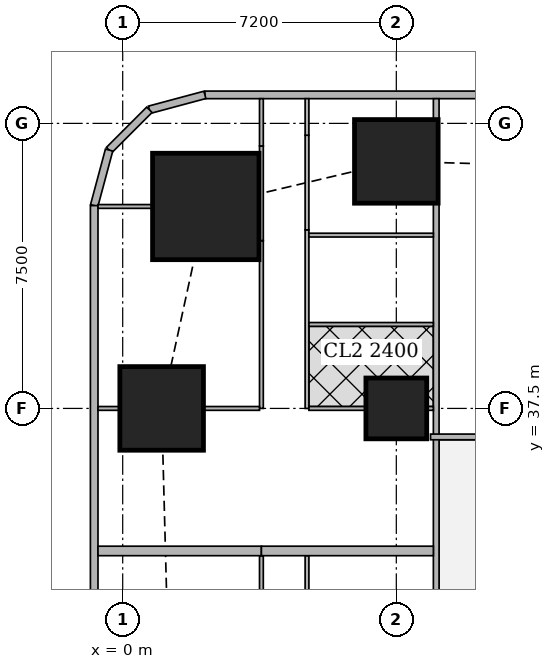
"""IFC4 building model, lengths in metres.
Left out: names, types, materials, properties, quantities, classifications, styles, units other than length and angle.
Written with IfcOpenShell. Run it as: python <this file> out.ifc"""

import sys

from ifc_helpers import new_model, si_unit, direction, frame, frame_2d, origin, origin_2d, place, context, subcontext, project, spatial, rectangle, extrude, element, fill, save


model = new_model("IFC4")
c1 = context("Model", 3, precision=1e-05, world=origin(), true_north=direction((0.0, 1.0)))
c2 = subcontext(c1, "Body", "Model", "MODEL_VIEW")
j1 = project(units=[si_unit("LENGTHUNIT", "METRE"), si_unit("PLANEANGLEUNIT", "RADIAN")], contexts=[c1])
p1 = place(None, origin())
s1 = spatial("IfcSite", under=j1, at=p1, CompositionType="ELEMENT")
p2 = place(p1, origin())
s2 = spatial("IfcBuilding", under=s1, at=p2, CompositionType="ELEMENT")
p3 = place(p2, frame((0.0, 0.0, 100.4)))
s3 = spatial("IfcBuildingStorey", under=s2, at=p3, CompositionType="ELEMENT", Elevation=100.4)
p4 = place(p3, frame((1.025, 37.5, 0.0), z_axis=(0.0, 0.0, 1.0), x_axis=(1.0, 0.0, 0.0)))
e1 = element("IfcColumn", 1, at=p4, inside=s3, PredefinedType="COLUMN", context=c2, shape_type="SweptSolid", body=[
    extrude(rectangle(XDim=2.2, YDim=2.2, at=origin_2d()), origin(), (0.0, 0.0, 1.0), 3.75),
])
p5 = place(p3, frame((7.2, 37.5, 0.0), z_axis=(0.0, 0.0, 1.0), x_axis=(1.0, 0.0, 0.0)))
e2 = element("IfcColumn", 2, at=p5, inside=s3, PredefinedType="COLUMN", context=c2, shape_type="SweptSolid", body=[
    extrude(rectangle(XDim=1.6, YDim=1.6, at=origin_2d()), origin(), (0.0, 0.0, 1.0), 3.75),
])
p6 = place(p3, frame((2.186, 42.814, 0.0), z_axis=(0.0, 0.0, 1.0), x_axis=(1.0, 0.0, 0.0)))
e3 = element("IfcColumn", 3, at=p6, inside=s3, PredefinedType="COLUMN", context=c2, shape_type="SweptSolid", body=[
    extrude(rectangle(XDim=2.8, YDim=2.8, at=origin_2d()), origin(), (0.0, 0.0, 1.0), 3.75),
])
p7 = place(p3, frame((7.2, 44.0, 0.0), z_axis=(0.0, 0.0, 1.0), x_axis=(1.0, 0.0, 0.0)))
e4 = element("IfcColumn", 4, at=p7, inside=s3, PredefinedType="COLUMN", context=c2, shape_type="SweptSolid", body=[
    extrude(rectangle(XDim=2.2, YDim=2.2, at=origin_2d()), origin(), (0.0, 0.0, 1.0), 3.75),
])
p8 = place(p3, frame((40.106, 45.75, 0.0), z_axis=(0.0, 0.0, 1.0), x_axis=(-1.0, 0.0, 0.0)))
e5 = element("IfcWall", 5, at=p8, inside=s3, PredefinedType="SOLIDWALL", context=c2, shape_type="SweptSolid", body=[
    extrude(rectangle(XDim=37.943, YDim=0.2, at=frame_2d((18.971, 0.0))), origin(), (0.0, 0.0, 1.0), 3.5),
])
p9 = place(p8, frame((8.606, 0.0, 0.9)))
e6 = element("IfcOpeningElement", 6, at=p9, cuts=e5, PredefinedType="OPENING", context=c2, shape_type="SweptSolid", body=[
    extrude(rectangle(XDim=1.8, YDim=1.5, at=frame_2d((0.9, 0.75))), frame((0.0, 0.11, 0.0), z_axis=(0.0, -1.0, 0.0), x_axis=(1.0, 0.0, 0.0)), (0.0, 0.0, 1.0), 0.22),
])
p10 = place(p8, frame((12.206, 0.0, 0.9)))
e7 = element("IfcOpeningElement", 7, at=p10, cuts=e5, PredefinedType="OPENING", context=c2, shape_type="SweptSolid", body=[
    extrude(rectangle(XDim=1.8, YDim=1.5, at=frame_2d((0.9, 0.75))), frame((0.0, 0.11, 0.0), z_axis=(0.0, -1.0, 0.0), x_axis=(1.0, 0.0, 0.0)), (0.0, 0.0, 1.0), 0.22),
])
p11 = place(p8, frame((15.806, 0.0, 0.9)))
e8 = element("IfcOpeningElement", 8, at=p11, cuts=e5, PredefinedType="OPENING", context=c2, shape_type="SweptSolid", body=[
    extrude(rectangle(XDim=1.8, YDim=1.5, at=frame_2d((0.9, 0.75))), frame((0.0, 0.11, 0.0), z_axis=(0.0, -1.0, 0.0), x_axis=(1.0, 0.0, 0.0)), (0.0, 0.0, 1.0), 0.22),
])
p12 = place(p8, frame((19.406, 0.0, 0.9)))
e9 = element("IfcOpeningElement", 9, at=p12, cuts=e5, PredefinedType="OPENING", context=c2, shape_type="SweptSolid", body=[
    extrude(rectangle(XDim=1.8, YDim=1.5, at=frame_2d((0.9, 0.75))), frame((0.0, 0.11, 0.0), z_axis=(0.0, -1.0, 0.0), x_axis=(1.0, 0.0, 0.0)), (0.0, 0.0, 1.0), 0.22),
])
p13 = place(p8, frame((23.006, 0.0, 0.9)))
e10 = element("IfcOpeningElement", 10, at=p13, cuts=e5, PredefinedType="OPENING", context=c2, shape_type="SweptSolid", body=[
    extrude(rectangle(XDim=1.8, YDim=1.5, at=frame_2d((0.9, 0.75))), frame((0.0, 0.11, 0.0), z_axis=(0.0, -1.0, 0.0), x_axis=(1.0, 0.0, 0.0)), (0.0, 0.0, 1.0), 0.22),
])
p14 = place(p8, frame((26.606, 0.0, 0.9)))
e11 = element("IfcOpeningElement", 11, at=p14, cuts=e5, PredefinedType="OPENING", context=c2, shape_type="SweptSolid", body=[
    extrude(rectangle(XDim=1.8, YDim=1.5, at=frame_2d((0.9, 0.75))), frame((0.0, 0.11, 0.0), z_axis=(0.0, -1.0, 0.0), x_axis=(1.0, 0.0, 0.0)), (0.0, 0.0, 1.0), 0.22),
])
p15 = place(p3, frame((2.163, 45.75, 0.0), z_axis=(0.0, 0.0, 1.0), x_axis=(-0.965832000415, -0.259168954497, 0.0)))
e12 = element("IfcWall", 12, at=p15, inside=s3, PredefinedType="SOLIDWALL", context=c2, shape_type="SweptSolid", body=[
    extrude(rectangle(XDim=1.513, YDim=0.2, at=frame_2d((0.756, 0.0))), origin(), (0.0, 0.0, 1.0), 3.5),
])
p16 = place(p3, frame((0.702, 45.358, 0.0), z_axis=(0.0, 0.0, 1.0), x_axis=(-0.707106781187, -0.707106781187, 0.0)))
e13 = element("IfcWall", 13, at=p16, inside=s3, PredefinedType="SOLIDWALL", context=c2, shape_type="SweptSolid", body=[
    extrude(rectangle(XDim=1.499, YDim=0.2, at=frame_2d((0.75, 0.0))), origin(), (0.0, 0.0, 1.0), 3.5),
])
p17 = place(p3, frame((-0.358, 44.298, 0.0), z_axis=(0.0, 0.0, 1.0), x_axis=(-0.259168954497, -0.965832000415, 0.0)))
e14 = element("IfcWall", 14, at=p17, inside=s3, PredefinedType="SOLIDWALL", context=c2, shape_type="SweptSolid", body=[
    extrude(rectangle(XDim=1.513, YDim=0.2, at=frame_2d((0.756, 0.0))), origin(), (0.0, 0.0, 1.0), 3.5),
])
p18 = place(p3, frame((-0.75, 42.837, 0.0), z_axis=(0.0, 0.0, 1.0), x_axis=(0.0, -1.0, 0.0)))
e15 = element("IfcWall", 15, at=p18, inside=s3, PredefinedType="SOLIDWALL", context=c2, shape_type="SweptSolid", body=[
    extrude(rectangle(XDim=40.674, YDim=0.2, at=frame_2d((20.337, 0.0))), origin(), (0.0, 0.0, 1.0), 3.5),
])
p19 = place(p18, frame((1.78, 0.0, 0.9)))
e16 = element("IfcOpeningElement", 16, at=p19, cuts=e15, PredefinedType="OPENING", context=c2, shape_type="SweptSolid", body=[
    extrude(rectangle(XDim=1.8, YDim=1.5, at=frame_2d((0.9, 0.75))), frame((0.0, 0.11, 0.0), z_axis=(0.0, -1.0, 0.0), x_axis=(1.0, 0.0, 0.0)), (0.0, 0.0, 1.0), 0.22),
])
p20 = place(p18, frame((6.312, 0.0, 0.9)))
e17 = element("IfcOpeningElement", 17, at=p20, cuts=e15, PredefinedType="OPENING", context=c2, shape_type="SweptSolid", body=[
    extrude(rectangle(XDim=1.8, YDim=1.5, at=frame_2d((0.9, 0.75))), frame((0.0, 0.11, 0.0), z_axis=(0.0, -1.0, 0.0), x_axis=(1.0, 0.0, 0.0)), (0.0, 0.0, 1.0), 0.22),
])
p21 = place(p18, frame((10.062, 0.0, 0.9)))
e18 = element("IfcOpeningElement", 18, at=p21, cuts=e15, PredefinedType="OPENING", context=c2, shape_type="SweptSolid", body=[
    extrude(rectangle(XDim=1.8, YDim=1.5, at=frame_2d((0.9, 0.75))), frame((0.0, 0.11, 0.0), z_axis=(0.0, -1.0, 0.0), x_axis=(1.0, 0.0, 0.0)), (0.0, 0.0, 1.0), 0.22),
])
p22 = place(p18, frame((13.812, 0.0, 0.9)))
e19 = element("IfcOpeningElement", 19, at=p22, cuts=e15, PredefinedType="OPENING", context=c2, shape_type="SweptSolid", body=[
    extrude(rectangle(XDim=1.8, YDim=1.5, at=frame_2d((0.9, 0.75))), frame((0.0, 0.11, 0.0), z_axis=(0.0, -1.0, 0.0), x_axis=(1.0, 0.0, 0.0)), (0.0, 0.0, 1.0), 0.22),
])
p23 = place(p18, frame((17.562, 0.0, 0.9)))
e20 = element("IfcOpeningElement", 20, at=p23, cuts=e15, PredefinedType="OPENING", context=c2, shape_type="SweptSolid", body=[
    extrude(rectangle(XDim=1.8, YDim=1.5, at=frame_2d((0.9, 0.75))), frame((0.0, 0.11, 0.0), z_axis=(0.0, -1.0, 0.0), x_axis=(1.0, 0.0, 0.0)), (0.0, 0.0, 1.0), 0.22),
])
p24 = place(p18, frame((21.312, 0.0, 0.9)))
e21 = element("IfcOpeningElement", 21, at=p24, cuts=e15, PredefinedType="OPENING", context=c2, shape_type="SweptSolid", body=[
    extrude(rectangle(XDim=1.8, YDim=1.5, at=frame_2d((0.9, 0.75))), frame((0.0, 0.11, 0.0), z_axis=(0.0, -1.0, 0.0), x_axis=(1.0, 0.0, 0.0)), (0.0, 0.0, 1.0), 0.22),
])
p25 = place(p18, frame((25.062, 0.0, 0.9)))
e22 = element("IfcOpeningElement", 22, at=p25, cuts=e15, PredefinedType="OPENING", context=c2, shape_type="SweptSolid", body=[
    extrude(rectangle(XDim=1.8, YDim=1.5, at=frame_2d((0.9, 0.75))), frame((0.0, 0.11, 0.0), z_axis=(0.0, -1.0, 0.0), x_axis=(1.0, 0.0, 0.0)), (0.0, 0.0, 1.0), 0.22),
])
p26 = place(p18, frame((28.812, 0.0, 0.9)))
e23 = element("IfcOpeningElement", 23, at=p26, cuts=e15, PredefinedType="OPENING", context=c2, shape_type="SweptSolid", body=[
    extrude(rectangle(XDim=1.8, YDim=1.5, at=frame_2d((0.9, 0.75))), frame((0.0, 0.11, 0.0), z_axis=(0.0, -1.0, 0.0), x_axis=(1.0, 0.0, 0.0)), (0.0, 0.0, 1.0), 0.22),
])
p27 = place(p18, frame((32.562, 0.0, 0.9)))
e24 = element("IfcOpeningElement", 24, at=p27, cuts=e15, PredefinedType="OPENING", context=c2, shape_type="SweptSolid", body=[
    extrude(rectangle(XDim=1.8, YDim=1.5, at=frame_2d((0.9, 0.75))), frame((0.0, 0.11, 0.0), z_axis=(0.0, -1.0, 0.0), x_axis=(1.0, 0.0, 0.0)), (0.0, 0.0, 1.0), 0.22),
])
p28 = place(p18, frame((37.094, 0.0, 0.9)))
e25 = element("IfcOpeningElement", 25, at=p28, cuts=e15, PredefinedType="OPENING", context=c2, shape_type="SweptSolid", body=[
    extrude(rectangle(XDim=1.8, YDim=1.5, at=frame_2d((0.9, 0.75))), frame((0.0, 0.11, 0.0), z_axis=(0.0, -1.0, 0.0), x_axis=(1.0, 0.0, 0.0)), (0.0, 0.0, 1.0), 0.22),
])
p29 = place(p3, frame((8.25, 2.126, 0.0), z_axis=(0.0, 0.0, 1.0), x_axis=(0.0, 1.0, 0.0)))
e26 = element("IfcWall", 26, at=p29, inside=s3, PredefinedType="SOLIDWALL", context=c2, shape_type="SweptSolid", body=[
    extrude(rectangle(XDim=40.773, YDim=0.15, at=frame_2d((20.386, 0.0))), origin(), (0.0, 0.0, 1.0), 3.5),
])
p30 = place(p29, frame((10.286, 0.0, 0.0)))
e27 = element("IfcOpeningElement", 27, at=p30, cuts=e26, PredefinedType="OPENING", context=c2, shape_type="SweptSolid", body=[
    extrude(rectangle(XDim=1.0, YDim=2.1, at=frame_2d((0.5, 1.05))), frame((0.0, 0.085, 0.0), z_axis=(0.0, -1.0, 0.0), x_axis=(1.0, 0.0, 0.0)), (0.0, 0.0, 1.0), 0.17),
])
p31 = place(p29, frame((14.461, 0.0, 0.0)))
e28 = element("IfcOpeningElement", 28, at=p31, cuts=e26, PredefinedType="OPENING", context=c2, shape_type="SweptSolid", body=[
    extrude(rectangle(XDim=1.0, YDim=2.1, at=frame_2d((0.5, 1.05))), frame((0.0, 0.085, 0.0), z_axis=(0.0, -1.0, 0.0), x_axis=(1.0, 0.0, 0.0)), (0.0, 0.0, 1.0), 0.17),
])
p32 = place(p29, frame((25.287, 0.0, 0.0)))
e29 = element("IfcOpeningElement", 29, at=p32, cuts=e26, PredefinedType="OPENING", context=c2, shape_type="SweptSolid", body=[
    extrude(rectangle(XDim=1.0, YDim=2.1, at=frame_2d((0.5, 1.05))), frame((0.0, 0.085, 0.0), z_axis=(0.0, -1.0, 0.0), x_axis=(1.0, 0.0, 0.0)), (0.0, 0.0, 1.0), 0.17),
])
p33 = place(p29, frame((32.787, 0.0, 0.0)))
e30 = element("IfcOpeningElement", 30, at=p33, cuts=e26, PredefinedType="OPENING", context=c2, shape_type="SweptSolid", body=[
    extrude(rectangle(XDim=1.0, YDim=2.1, at=frame_2d((0.5, 1.05))), frame((0.0, 0.085, 0.0), z_axis=(0.0, -1.0, 0.0), x_axis=(1.0, 0.0, 0.0)), (0.0, 0.0, 1.0), 0.17),
])
p34 = place(p3, frame((8.25, 45.101, 0.0), z_axis=(0.0, 0.0, 1.0), x_axis=(0.0, 1.0, 0.0)))
e31 = element("IfcWall", 31, at=p34, inside=s3, PredefinedType="SOLIDWALL", context=c2, shape_type="SweptSolid", body=[
    extrude(rectangle(XDim=0.549, YDim=0.15, at=frame_2d((0.274, 0.0))), origin(), (0.0, 0.0, 1.0), 3.5),
])
p35 = place(p3, frame((8.1, 36.75, 0.0), z_axis=(0.0, 0.0, 1.0), x_axis=(1.0, 0.0, 0.0)))
e32 = element("IfcWall", 32, at=p35, inside=s3, PredefinedType="SOLIDWALL", context=c2, shape_type="SweptSolid", body=[
    extrude(rectangle(XDim=5.499, YDim=0.15, at=frame_2d((2.75, 0.0))), origin(), (0.0, 0.0, 1.0), 3.5),
])
p36 = place(p35, frame((2.725, 0.0, 0.0)))
e33 = element("IfcOpeningElement", 33, at=p36, cuts=e32, PredefinedType="OPENING", context=c2, shape_type="SweptSolid", body=[
    extrude(rectangle(XDim=1.0, YDim=2.1, at=frame_2d((0.5, 1.05))), frame((0.0, 0.085, 0.0), z_axis=(0.0, -1.0, 0.0), x_axis=(1.0, 0.0, 0.0)), (0.0, 0.0, 1.0), 0.17),
])
p37 = place(p3, frame((3.65, 30.0, 0.0), z_axis=(0.0, 0.0, 1.0), x_axis=(0.0, 1.0, 0.0)))
e34 = element("IfcWall", 34, at=p37, inside=s3, PredefinedType="PARTITIONING", context=c2, shape_type="SweptSolid", body=[
    extrude(rectangle(XDim=3.625, YDim=0.1, at=frame_2d((1.812, 0.0))), origin(), (0.0, 0.0, 1.0), 3.5),
])
p38 = place(p37, frame((0.2, 0.0, 0.0)))
e35 = element("IfcOpeningElement", 35, at=p38, cuts=e34, PredefinedType="OPENING", context=c2, shape_type="SweptSolid", body=[
    extrude(rectangle(XDim=0.9, YDim=2.1, at=frame_2d((0.45, 1.05))), frame((0.0, 0.06, 0.0), z_axis=(0.0, -1.0, 0.0), x_axis=(1.0, 0.0, 0.0)), (0.0, 0.0, 1.0), 0.12),
])
p39 = place(p3, frame((4.85, 30.0, 0.0), z_axis=(0.0, 0.0, 1.0), x_axis=(0.0, 1.0, 0.0)))
e36 = element("IfcWall", 36, at=p39, inside=s3, PredefinedType="PARTITIONING", context=c2, shape_type="SweptSolid", body=[
    extrude(rectangle(XDim=3.625, YDim=0.1, at=frame_2d((1.812, 0.0))), origin(), (0.0, 0.0, 1.0), 3.5),
])
p40 = place(p39, frame((0.655, 0.0, 0.0)))
e37 = element("IfcOpeningElement", 37, at=p40, cuts=e36, PredefinedType="OPENING", context=c2, shape_type="SweptSolid", body=[
    extrude(rectangle(XDim=0.9, YDim=2.1, at=frame_2d((0.45, 1.05))), frame((0.0, 0.06, 0.0), z_axis=(0.0, -1.0, 0.0), x_axis=(1.0, 0.0, 0.0)), (0.0, 0.0, 1.0), 0.12),
])
p41 = place(p39, frame((2.53, 0.0, 0.0)))
e38 = element("IfcOpeningElement", 38, at=p41, cuts=e36, PredefinedType="OPENING", context=c2, shape_type="SweptSolid", body=[
    extrude(rectangle(XDim=0.9, YDim=2.1, at=frame_2d((0.45, 1.05))), frame((0.0, 0.06, 0.0), z_axis=(0.0, -1.0, 0.0), x_axis=(1.0, 0.0, 0.0)), (0.0, 0.0, 1.0), 0.12),
])
p42 = place(p3, frame((3.65, 37.5, 0.0), z_axis=(0.0, 0.0, 1.0), x_axis=(0.0, 1.0, 0.0)))
e39 = element("IfcWall", 39, at=p42, inside=s3, PredefinedType="PARTITIONING", context=c2, shape_type="SweptSolid", body=[
    extrude(rectangle(XDim=4.415, YDim=0.1, at=frame_2d((2.208, 0.0))), origin(), (0.0, 0.0, 1.0), 3.5),
])
p43 = place(p42, frame((0.2, 0.0, 0.0)))
e40 = element("IfcOpeningElement", 40, at=p43, cuts=e39, PredefinedType="OPENING", context=c2, shape_type="SweptSolid", body=[
    extrude(rectangle(XDim=0.9, YDim=2.1, at=frame_2d((0.45, 1.05))), frame((0.0, 0.06, 0.0), z_axis=(0.0, -1.0, 0.0), x_axis=(1.0, 0.0, 0.0)), (0.0, 0.0, 1.0), 0.12),
])
p44 = place(p3, frame((3.65, 41.915, 0.0), z_axis=(0.0, 0.0, 1.0), x_axis=(0.0, 1.0, 0.0)))
e41 = element("IfcWall", 41, at=p44, inside=s3, PredefinedType="PARTITIONING", context=c2, shape_type="SweptSolid", body=[
    extrude(rectangle(XDim=2.49, YDim=0.1, at=frame_2d((1.245, 0.0))), origin(), (0.0, 0.0, 1.0), 2.05),
])
p45 = place(p3, frame((3.65, 44.405, 0.0), z_axis=(0.0, 0.0, 1.0), x_axis=(0.0, 1.0, 0.0)))
e42 = element("IfcWall", 42, at=p45, inside=s3, PredefinedType="PARTITIONING", context=c2, shape_type="SweptSolid", body=[
    extrude(rectangle(XDim=1.245, YDim=0.1, at=frame_2d((0.623, 0.0))), origin(), (0.0, 0.0, 1.0), 3.5),
])
p46 = place(p3, frame((4.85, 37.5, 0.0), z_axis=(0.0, 0.0, 1.0), x_axis=(0.0, 1.0, 0.0)))
e43 = element("IfcWall", 43, at=p46, inside=s3, PredefinedType="PARTITIONING", context=c2, shape_type="SweptSolid", body=[
    extrude(rectangle(XDim=4.699, YDim=0.1, at=frame_2d((2.35, 0.0))), origin(), (0.0, 0.0, 1.0), 3.5),
])
p47 = place(p46, frame((0.655, 0.0, 0.0)))
e44 = element("IfcOpeningElement", 44, at=p47, cuts=e43, PredefinedType="OPENING", context=c2, shape_type="SweptSolid", body=[
    extrude(rectangle(XDim=0.9, YDim=2.1, at=frame_2d((0.45, 1.05))), frame((0.0, 0.06, 0.0), z_axis=(0.0, -1.0, 0.0), x_axis=(1.0, 0.0, 0.0)), (0.0, 0.0, 1.0), 0.12),
])
p48 = place(p46, frame((2.53, 0.0, 0.0)))
e45 = element("IfcOpeningElement", 45, at=p48, cuts=e43, PredefinedType="OPENING", context=c2, shape_type="SweptSolid", body=[
    extrude(rectangle(XDim=0.9, YDim=2.1, at=frame_2d((0.45, 1.05))), frame((0.0, 0.06, 0.0), z_axis=(0.0, -1.0, 0.0), x_axis=(1.0, 0.0, 0.0)), (0.0, 0.0, 1.0), 0.12),
])
p49 = place(p3, frame((4.85, 42.199, 0.0), z_axis=(0.0, 0.0, 1.0), x_axis=(0.0, 1.0, 0.0)))
e46 = element("IfcWall", 46, at=p49, inside=s3, PredefinedType="PARTITIONING", context=c2, shape_type="SweptSolid", body=[
    extrude(rectangle(XDim=2.49, YDim=0.1, at=frame_2d((1.245, 0.0))), origin(), (0.0, 0.0, 1.0), 2.05),
])
p50 = place(p3, frame((4.85, 44.689, 0.0), z_axis=(0.0, 0.0, 1.0), x_axis=(0.0, 1.0, 0.0)))
e47 = element("IfcWall", 47, at=p50, inside=s3, PredefinedType="PARTITIONING", context=c2, shape_type="SweptSolid", body=[
    extrude(rectangle(XDim=0.961, YDim=0.1, at=frame_2d((0.48, 0.0))), origin(), (0.0, 0.0, 1.0), 3.5),
])
p51 = place(p3, frame((-0.65, 37.5, 0.0), z_axis=(0.0, 0.0, 1.0), x_axis=(1.0, 0.0, 0.0)))
e48 = element("IfcWall", 48, at=p51, inside=s3, PredefinedType="PARTITIONING", context=c2, shape_type="SweptSolid", body=[
    extrude(rectangle(XDim=0.574, YDim=0.1, at=frame_2d((0.287, 0.0))), origin(), (0.0, 0.0, 1.0), 2.05),
])
p52 = place(p3, frame((2.126, 37.5, 0.0), z_axis=(0.0, 0.0, 1.0), x_axis=(1.0, 0.0, 0.0)))
e49 = element("IfcWall", 49, at=p52, inside=s3, PredefinedType="PARTITIONING", context=c2, shape_type="SweptSolid", body=[
    extrude(rectangle(XDim=1.474, YDim=0.1, at=frame_2d((0.737, 0.0))), origin(), (0.0, 0.0, 1.0), 2.05),
])
p53 = place(p3, frame((-0.65, 42.814, 0.0), z_axis=(0.0, 0.0, 1.0), x_axis=(1.0, 0.0, 0.0)))
e50 = element("IfcWall", 50, at=p53, inside=s3, PredefinedType="PARTITIONING", context=c2, shape_type="SweptSolid", body=[
    extrude(rectangle(XDim=1.435, YDim=0.1, at=frame_2d((0.717, 0.0))), origin(), (0.0, 0.0, 1.0), 3.5),
])
p54 = place(p3, frame((4.9, 37.5, 0.0), z_axis=(0.0, 0.0, 1.0), x_axis=(1.0, 0.0, 0.0)))
e51 = element("IfcWall", 51, at=p54, inside=s3, PredefinedType="PARTITIONING", context=c2, shape_type="SweptSolid", body=[
    extrude(rectangle(XDim=1.499, YDim=0.1, at=frame_2d((0.75, 0.0))), origin(), (0.0, 0.0, 1.0), 3.5),
])
p55 = place(p3, frame((8.001, 37.5, 0.0), z_axis=(0.0, 0.0, 1.0), x_axis=(1.0, 0.0, 0.0)))
e52 = element("IfcWall", 52, at=p55, inside=s3, PredefinedType="PARTITIONING", context=c2, shape_type="SweptSolid", body=[
    extrude(rectangle(XDim=0.174, YDim=0.1, at=frame_2d((0.087, 0.0))), origin(), (0.0, 0.0, 1.0), 3.5),
])
p56 = place(p3, frame((4.9, 39.71, 0.0), z_axis=(0.0, 0.0, 1.0), x_axis=(1.0, 0.0, 0.0)))
e53 = element("IfcWall", 53, at=p56, inside=s3, PredefinedType="PARTITIONING", context=c2, shape_type="SweptSolid", body=[
    extrude(rectangle(XDim=3.275, YDim=0.1, at=frame_2d((1.638, 0.0))), origin(), (0.0, 0.0, 1.0), 3.5),
])
p57 = place(p3, frame((-0.65, 33.75, 0.0), z_axis=(0.0, 0.0, 1.0), x_axis=(1.0, 0.0, 0.0)))
e54 = element("IfcWall", 54, at=p57, inside=s3, PredefinedType="SOLIDWALL", context=c2, shape_type="SweptSolid", body=[
    extrude(rectangle(XDim=4.3, YDim=0.25, at=frame_2d((2.15, 0.0))), origin(), (0.0, 0.0, 1.0), 2.2),
])
p58 = place(p3, frame((3.65, 33.75, 0.0), z_axis=(0.0, 0.0, 1.0), x_axis=(1.0, 0.0, 0.0)))
e55 = element("IfcWall", 55, at=p58, inside=s3, PredefinedType="SOLIDWALL", context=c2, shape_type="SweptSolid", body=[
    extrude(rectangle(XDim=4.525, YDim=0.25, at=frame_2d((2.263, 0.0))), origin(), (0.0, 0.0, 1.0), 3.5),
])
p59 = place(p3, frame((8.175, 42.06, 0.0), z_axis=(0.0, 0.0, 1.0), x_axis=(-1.0, 0.0, 0.0)))
e56 = element("IfcWall", 56, at=p59, inside=s3, PredefinedType="PARTITIONING", context=c2, shape_type="SweptSolid", body=[
    extrude(rectangle(XDim=3.275, YDim=0.1, at=frame_2d((1.638, 0.0))), origin(), (0.0, 0.0, 1.0), 3.5),
])
p60 = place(p59, frame((2.1, 0.0, 0.0)))
e57 = element("IfcOpeningElement", 57, at=p60, cuts=e56, PredefinedType="OPENING", context=c2, shape_type="SweptSolid", body=[
    extrude(rectangle(XDim=0.9, YDim=2.1, at=frame_2d((0.45, 1.05))), frame((0.0, 0.06, 0.0), z_axis=(0.0, -1.0, 0.0), x_axis=(1.0, 0.0, 0.0)), (0.0, 0.0, 1.0), 0.12),
])
p61 = place(p19, origin())
e58 = element("IfcWindow", 58, at=p61, inside=s3, PartitioningType="SINGLE_PANEL", PredefinedType="WINDOW", context=c2, shape_type="SweptSolid", body=[
    extrude(rectangle(XDim=1.8, YDim=1.5, at=frame_2d((0.9, 0.75))), frame((0.0, 0.03, 0.0), z_axis=(0.0, -1.0, 0.0), x_axis=(1.0, 0.0, 0.0)), (0.0, 0.0, 1.0), 0.06),
])
fill(e16, e58)
p62 = place(p20, origin())
e59 = element("IfcWindow", 59, at=p62, inside=s3, PartitioningType="SINGLE_PANEL", PredefinedType="WINDOW", context=c2, shape_type="SweptSolid", body=[
    extrude(rectangle(XDim=1.8, YDim=1.5, at=frame_2d((0.9, 0.75))), frame((0.0, 0.03, 0.0), z_axis=(0.0, -1.0, 0.0), x_axis=(1.0, 0.0, 0.0)), (0.0, 0.0, 1.0), 0.06),
])
fill(e17, e59)
p63 = place(p21, origin())
e60 = element("IfcWindow", 60, at=p63, inside=s3, PartitioningType="SINGLE_PANEL", PredefinedType="WINDOW", context=c2, shape_type="SweptSolid", body=[
    extrude(rectangle(XDim=1.8, YDim=1.5, at=frame_2d((0.9, 0.75))), frame((0.0, 0.03, 0.0), z_axis=(0.0, -1.0, 0.0), x_axis=(1.0, 0.0, 0.0)), (0.0, 0.0, 1.0), 0.06),
])
fill(e18, e60)
p64 = place(p41, origin())
e61 = element("IfcDoor", 61, at=p64, inside=s3, OperationType="SINGLE_SWING_LEFT", PredefinedType="DOOR", context=c2, shape_type="SweptSolid", body=[
    extrude(rectangle(XDim=0.9, YDim=2.1, at=frame_2d((0.45, 1.05))), frame((0.0, 0.025, 0.0), z_axis=(0.0, -1.0, 0.0), x_axis=(1.0, 0.0, 0.0)), (0.0, 0.0, 1.0), 0.05),
])
fill(e38, e61)
p65 = place(p43, origin())
e62 = element("IfcDoor", 62, at=p65, inside=s3, OperationType="SINGLE_SWING_LEFT", PredefinedType="DOOR", context=c2, shape_type="SweptSolid", body=[
    extrude(rectangle(XDim=0.9, YDim=2.1, at=frame_2d((0.45, 1.05))), frame((0.0, 0.025, 0.0), z_axis=(0.0, -1.0, 0.0), x_axis=(1.0, 0.0, 0.0)), (0.0, 0.0, 1.0), 0.05),
])
fill(e40, e62)
p66 = place(p47, origin())
e63 = element("IfcDoor", 63, at=p66, inside=s3, OperationType="SINGLE_SWING_RIGHT", PredefinedType="DOOR", context=c2, shape_type="SweptSolid", body=[
    extrude(rectangle(XDim=0.9, YDim=2.1, at=frame_2d((0.45, 1.05))), frame((0.0, 0.025, 0.0), z_axis=(0.0, -1.0, 0.0), x_axis=(1.0, 0.0, 0.0)), (0.0, 0.0, 1.0), 0.05),
])
fill(e44, e63)
p67 = place(p48, origin())
e64 = element("IfcDoor", 64, at=p67, inside=s3, OperationType="SINGLE_SWING_RIGHT", PredefinedType="DOOR", context=c2, shape_type="SweptSolid", body=[
    extrude(rectangle(XDim=0.9, YDim=2.1, at=frame_2d((0.45, 1.05))), frame((0.0, 0.025, 0.0), z_axis=(0.0, -1.0, 0.0), x_axis=(1.0, 0.0, 0.0)), (0.0, 0.0, 1.0), 0.05),
])
fill(e45, e64)
p68 = place(p33, origin())
e65 = element("IfcDoor", 65, at=p68, inside=s3, OperationType="SINGLE_SWING_LEFT", PredefinedType="DOOR", context=c2, shape_type="SweptSolid", body=[
    extrude(rectangle(XDim=1.0, YDim=2.1, at=frame_2d((0.5, 1.05))), frame((0.0, 0.025, 0.0), z_axis=(0.0, -1.0, 0.0), x_axis=(1.0, 0.0, 0.0)), (0.0, 0.0, 1.0), 0.05),
])
fill(e30, e65)
p69 = place(p60, origin())
e66 = element("IfcDoor", 66, at=p69, inside=s3, OperationType="SINGLE_SWING_LEFT", PredefinedType="DOOR", context=c2, shape_type="SweptSolid", body=[
    extrude(rectangle(XDim=0.9, YDim=2.1, at=frame_2d((0.45, 1.05))), frame((0.0, 0.025, 0.0), z_axis=(0.0, -1.0, 0.0), x_axis=(1.0, 0.0, 0.0)), (0.0, 0.0, 1.0), 0.05),
])
fill(e57, e66)
save(model, sys.argv[1])
